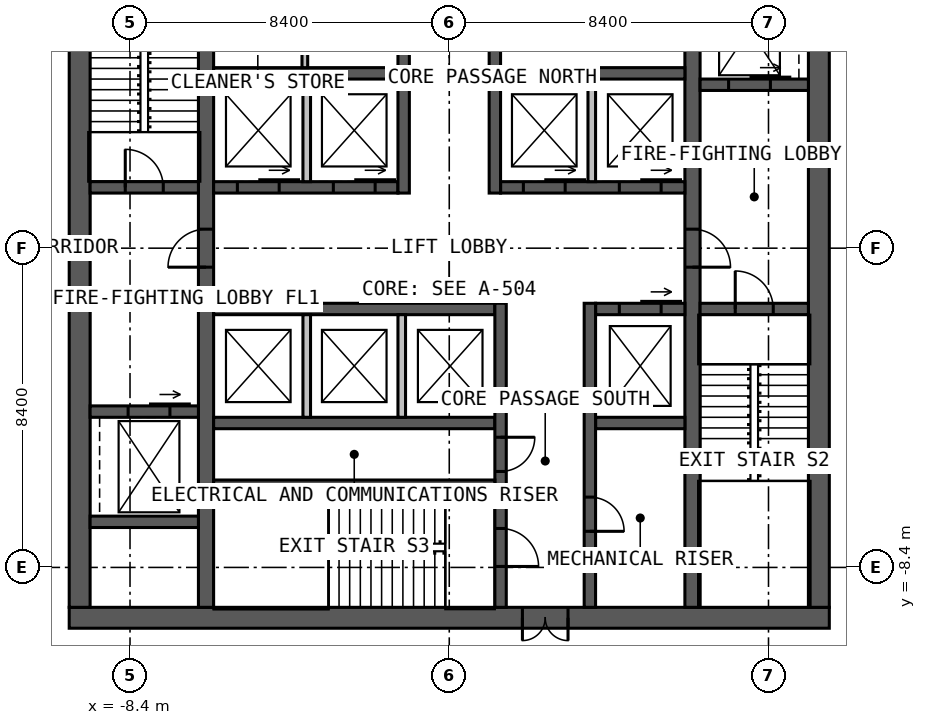
"""IFC4 building model, lengths in metres.
Left out: names, types, materials, properties, quantities, classifications, styles, units other than length and angle.
Written with IfcOpenShell. Run it as: python <this file> out.ifc"""

import sys

from ifc_helpers import new_model, si_unit, direction, frame, frame_2d, origin, place, context, subcontext, project, spatial, rectangle, extrude, element, fill, save


model = new_model("IFC4")
c1 = context("Model", 3, precision=1e-05, world=origin(), true_north=direction((0.0, 1.0)))
c2 = subcontext(c1, "Body", "Model", "MODEL_VIEW")
j1 = project(units=[si_unit("LENGTHUNIT", "METRE"), si_unit("PLANEANGLEUNIT", "RADIAN")], contexts=[c1])
p1 = place(None, origin())
s1 = spatial("IfcSite", under=j1, at=p1, CompositionType="ELEMENT")
p2 = place(p1, origin())
s2 = spatial("IfcBuilding", under=s1, at=p2, CompositionType="ELEMENT")
p3 = place(p2, frame((0.0, 0.0, 102.0)))
s3 = spatial("IfcBuildingStorey", under=s2, at=p3, CompositionType="ELEMENT", Elevation=102.0)
p4 = place(p3, frame((10.0, -9.725, 0.0), z_axis=(0.0, 0.0, 1.0), x_axis=(-1.0, 0.0, 0.0)))
e1 = element("IfcWall", 1, at=p4, inside=s3, PredefinedType="SOLIDWALL", context=c2, shape_type="SweptSolid", body=[
    extrude(rectangle(XDim=20.0, YDim=0.55, at=frame_2d((10.0, 0.0))), origin(), (0.0, 0.0, 1.0), 4.0),
])
p5 = place(p4, frame((6.875, 0.0, 0.0)))
e2 = element("IfcOpeningElement", 2, at=p5, cuts=e1, PredefinedType="OPENING", context=c2, shape_type="SweptSolid", body=[
    extrude(rectangle(XDim=1.2, YDim=2.2, at=frame_2d((0.6, 1.1))), frame((0.0, 0.285, 0.0), z_axis=(0.0, -1.0, 0.0), x_axis=(1.0, 0.0, 0.0)), (0.0, 0.0, 1.0), 0.57),
])
for number, where, z_axis, x_axis in (
    (3, (9.725, -9.45, 0.0), (0.0, 0.0, 1.0), (0.0, 1.0, 0.0)),
    (4, (-9.725, 9.45, 0.0), (0.0, 0.0, 1.0), (0.0, -1.0, 0.0)),
):
    element("IfcWall", number, at=place(p3, frame(where, z_axis=z_axis, x_axis=x_axis)), inside=s3, PredefinedType="SOLIDWALL", context=c2, shape_type="SweptSolid", body=[
        extrude(rectangle(XDim=18.9, YDim=0.55, at=frame_2d((9.45, 0.0))), origin(), (0.0, 0.0, 1.0), 4.0),
    ])
p6 = place(p3, frame((-6.4, -9.45, 0.0), z_axis=(0.0, 0.0, 1.0), x_axis=(0.0, 1.0, 0.0)))
e5 = element("IfcWall", 5, at=p6, inside=s3, PredefinedType="SOLIDWALL", context=c2, shape_type="SweptSolid", body=[
    extrude(rectangle(XDim=18.9, YDim=0.4, at=frame_2d((9.45, 0.0))), origin(), (0.0, 0.0, 1.0), 4.0),
])
p7 = place(p6, frame((8.95, 0.0, 0.0)))
e6 = element("IfcOpeningElement", 6, at=p7, cuts=e5, PredefinedType="OPENING", context=c2, shape_type="SweptSolid", body=[
    extrude(rectangle(XDim=1.0, YDim=2.2, at=frame_2d((0.5, 1.1))), frame((0.0, 0.21, 0.0), z_axis=(0.0, -1.0, 0.0), x_axis=(1.0, 0.0, 0.0)), (0.0, 0.0, 1.0), 0.42),
])
p8 = place(p3, frame((6.4, 9.45, 0.0), z_axis=(0.0, 0.0, 1.0), x_axis=(0.0, -1.0, 0.0)))
e7 = element("IfcWall", 7, at=p8, inside=s3, PredefinedType="SOLIDWALL", context=c2, shape_type="SweptSolid", body=[
    extrude(rectangle(XDim=18.9, YDim=0.4, at=frame_2d((9.45, 0.0))), origin(), (0.0, 0.0, 1.0), 4.0),
])
p9 = place(p8, frame((8.95, 0.0, 0.0)))
e8 = element("IfcOpeningElement", 8, at=p9, cuts=e7, PredefinedType="OPENING", context=c2, shape_type="SweptSolid", body=[
    extrude(rectangle(XDim=1.0, YDim=2.2, at=frame_2d((0.5, 1.1))), frame((0.0, 0.21, 0.0), z_axis=(0.0, -1.0, 0.0), x_axis=(1.0, 0.0, 0.0)), (0.0, 0.0, 1.0), 0.42),
])
p10 = place(p3, frame((-6.2, 1.6, 0.0), z_axis=(0.0, 0.0, 1.0), x_axis=(1.0, 0.0, 0.0)))
e9 = element("IfcWall", 9, at=p10, inside=s3, PredefinedType="SOLIDWALL", context=c2, shape_type="SweptSolid", body=[
    extrude(rectangle(XDim=4.85, YDim=0.3, at=frame_2d((2.425, 0.0))), origin(), (0.0, 0.0, 1.0), 4.0),
])
p11 = place(p10, frame((0.625, 0.0, 0.0)))
e10 = element("IfcOpeningElement", 10, at=p11, cuts=e9, PredefinedType="OPENING", context=c2, shape_type="SweptSolid", body=[
    extrude(rectangle(XDim=1.1, YDim=2.2, at=frame_2d((0.55, 1.1))), frame((0.0, 0.16, 0.0), z_axis=(0.0, -1.0, 0.0), x_axis=(1.0, 0.0, 0.0)), (0.0, 0.0, 1.0), 0.32),
])
p12 = place(p10, frame((3.15, 0.0, 0.0)))
e11 = element("IfcOpeningElement", 11, at=p12, cuts=e9, PredefinedType="OPENING", context=c2, shape_type="SweptSolid", body=[
    extrude(rectangle(XDim=1.1, YDim=2.2, at=frame_2d((0.55, 1.1))), frame((0.0, 0.16, 0.0), z_axis=(0.0, -1.0, 0.0), x_axis=(1.0, 0.0, 0.0)), (0.0, 0.0, 1.0), 0.32),
])
p13 = place(p3, frame((1.35, 1.6, 0.0), z_axis=(0.0, 0.0, 1.0), x_axis=(1.0, 0.0, 0.0)))
e12 = element("IfcWall", 12, at=p13, inside=s3, PredefinedType="SOLIDWALL", context=c2, shape_type="SweptSolid", body=[
    extrude(rectangle(XDim=4.85, YDim=0.3, at=frame_2d((2.425, 0.0))), origin(), (0.0, 0.0, 1.0), 4.0),
])
p14 = place(p13, frame((0.6, 0.0, 0.0)))
e13 = element("IfcOpeningElement", 13, at=p14, cuts=e12, PredefinedType="OPENING", context=c2, shape_type="SweptSolid", body=[
    extrude(rectangle(XDim=1.1, YDim=2.2, at=frame_2d((0.55, 1.1))), frame((0.0, 0.16, 0.0), z_axis=(0.0, -1.0, 0.0), x_axis=(1.0, 0.0, 0.0)), (0.0, 0.0, 1.0), 0.32),
])
p15 = place(p13, frame((3.125, 0.0, 0.0)))
e14 = element("IfcOpeningElement", 14, at=p15, cuts=e12, PredefinedType="OPENING", context=c2, shape_type="SweptSolid", body=[
    extrude(rectangle(XDim=1.1, YDim=2.2, at=frame_2d((0.55, 1.1))), frame((0.0, 0.16, 0.0), z_axis=(0.0, -1.0, 0.0), x_axis=(1.0, 0.0, 0.0)), (0.0, 0.0, 1.0), 0.32),
])
for number, where, z_axis, x_axis in (
    (15, (-6.2, 4.6, 0.0), (0.0, 0.0, 1.0), (1.0, 0.0, 0.0)),
    (16, (1.35, 4.6, 0.0), (0.0, 0.0, 1.0), (1.0, 0.0, 0.0)),
):
    element("IfcWall", number, at=place(p3, frame(where, z_axis=z_axis, x_axis=x_axis)), inside=s3, PredefinedType="SOLIDWALL", context=c2, shape_type="SweptSolid", body=[
        extrude(rectangle(XDim=4.85, YDim=0.3, at=frame_2d((2.425, 0.0))), origin(), (0.0, 0.0, 1.0), 4.0),
    ])
p16 = place(p3, frame((-1.2, 1.45, 0.0), z_axis=(0.0, 0.0, 1.0), x_axis=(0.0, 1.0, 0.0)))
e17 = element("IfcWall", 17, at=p16, inside=s3, PredefinedType="SOLIDWALL", context=c2, shape_type="SweptSolid", body=[
    extrude(rectangle(XDim=8.0, YDim=0.3, at=frame_2d((4.0, 0.0))), origin(), (0.0, 0.0, 1.0), 4.0),
])
p17 = place(p16, frame((5.05, 0.0, 0.0)))
e18 = element("IfcOpeningElement", 18, at=p17, cuts=e17, PredefinedType="OPENING", context=c2, shape_type="SweptSolid", body=[
    extrude(rectangle(XDim=1.0, YDim=2.2, at=frame_2d((0.5, 1.1))), frame((0.0, 0.16, 0.0), z_axis=(0.0, -1.0, 0.0), x_axis=(1.0, 0.0, 0.0)), (0.0, 0.0, 1.0), 0.32),
])
p18 = place(p3, frame((1.2, 1.45, 0.0), z_axis=(0.0, 0.0, 1.0), x_axis=(0.0, 1.0, 0.0)))
e19 = element("IfcWall", 19, at=p18, inside=s3, PredefinedType="SOLIDWALL", context=c2, shape_type="SweptSolid", body=[
    extrude(rectangle(XDim=8.0, YDim=0.3, at=frame_2d((4.0, 0.0))), origin(), (0.0, 0.0, 1.0), 4.0),
])
p19 = place(p18, frame((3.8, 0.0, 0.0)))
e20 = element("IfcOpeningElement", 20, at=p19, cuts=e19, PredefinedType="OPENING", context=c2, shape_type="SweptSolid", body=[
    extrude(rectangle(XDim=1.0, YDim=2.2, at=frame_2d((0.5, 1.1))), frame((0.0, 0.16, 0.0), z_axis=(0.0, -1.0, 0.0), x_axis=(1.0, 0.0, 0.0)), (0.0, 0.0, 1.0), 0.32),
])
p20 = place(p18, frame((6.15, 0.0, 0.0)))
e21 = element("IfcOpeningElement", 21, at=p20, cuts=e19, PredefinedType="OPENING", context=c2, shape_type="SweptSolid", body=[
    extrude(rectangle(XDim=1.0, YDim=2.2, at=frame_2d((0.5, 1.1))), frame((0.0, 0.16, 0.0), z_axis=(0.0, -1.0, 0.0), x_axis=(1.0, 0.0, 0.0)), (0.0, 0.0, 1.0), 0.32),
])
p21 = place(p3, frame((-6.2, -1.6, 0.0), z_axis=(0.0, 0.0, 1.0), x_axis=(1.0, 0.0, 0.0)))
e22 = element("IfcWall", 22, at=p21, inside=s3, PredefinedType="SOLIDWALL", context=c2, shape_type="SweptSolid", body=[
    extrude(rectangle(XDim=7.4, YDim=0.3, at=frame_2d((3.7, 0.0))), origin(), (0.0, 0.0, 1.0), 4.0),
])
p22 = place(p3, frame((3.85, -1.6, 0.0), z_axis=(0.0, 0.0, 1.0), x_axis=(1.0, 0.0, 0.0)))
e23 = element("IfcWall", 23, at=p22, inside=s3, PredefinedType="SOLIDWALL", context=c2, shape_type="SweptSolid", body=[
    extrude(rectangle(XDim=2.35, YDim=0.3, at=frame_2d((1.175, 0.0))), origin(), (0.0, 0.0, 1.0), 4.0),
])
p23 = place(p22, frame((0.625, 0.0, 0.0)))
e24 = element("IfcOpeningElement", 24, at=p23, cuts=e23, PredefinedType="OPENING", context=c2, shape_type="SweptSolid", body=[
    extrude(rectangle(XDim=1.1, YDim=2.2, at=frame_2d((0.55, 1.1))), frame((0.0, 0.16, 0.0), z_axis=(0.0, -1.0, 0.0), x_axis=(1.0, 0.0, 0.0)), (0.0, 0.0, 1.0), 0.32),
])
p24 = place(p3, frame((-6.2, -4.6, 0.0), z_axis=(0.0, 0.0, 1.0), x_axis=(1.0, 0.0, 0.0)))
e25 = element("IfcWall", 25, at=p24, inside=s3, PredefinedType="SOLIDWALL", context=c2, shape_type="SweptSolid", body=[
    extrude(rectangle(XDim=7.4, YDim=0.3, at=frame_2d((3.7, 0.0))), origin(), (0.0, 0.0, 1.0), 4.0),
])
p25 = place(p3, frame((3.85, -4.6, 0.0), z_axis=(0.0, 0.0, 1.0), x_axis=(1.0, 0.0, 0.0)))
e26 = element("IfcWall", 26, at=p25, inside=s3, PredefinedType="SOLIDWALL", context=c2, shape_type="SweptSolid", body=[
    extrude(rectangle(XDim=2.35, YDim=0.3, at=frame_2d((1.175, 0.0))), origin(), (0.0, 0.0, 1.0), 4.0),
])
p26 = place(p3, frame((1.35, -1.45, 0.0), z_axis=(0.0, 0.0, 1.0), x_axis=(0.0, -1.0, 0.0)))
e27 = element("IfcWall", 27, at=p26, inside=s3, PredefinedType="SOLIDWALL", context=c2, shape_type="SweptSolid", body=[
    extrude(rectangle(XDim=8.0, YDim=0.3, at=frame_2d((4.0, 0.0))), origin(), (0.0, 0.0, 1.0), 4.0),
])
p27 = place(p26, frame((5.925, 0.0, 0.0)))
e28 = element("IfcOpeningElement", 28, at=p27, cuts=e27, PredefinedType="OPENING", context=c2, shape_type="SweptSolid", body=[
    extrude(rectangle(XDim=1.0, YDim=2.2, at=frame_2d((0.5, 1.1))), frame((0.0, 0.16, 0.0), z_axis=(0.0, -1.0, 0.0), x_axis=(1.0, 0.0, 0.0)), (0.0, 0.0, 1.0), 0.32),
])
p28 = place(p26, frame((3.525, 0.0, 0.0)))
e29 = element("IfcOpeningElement", 29, at=p28, cuts=e27, PredefinedType="OPENING", context=c2, shape_type="SweptSolid", body=[
    extrude(rectangle(XDim=0.9, YDim=2.2, at=frame_2d((0.45, 1.1))), frame((0.0, 0.16, 0.0), z_axis=(0.0, -1.0, 0.0), x_axis=(1.0, 0.0, 0.0)), (0.0, 0.0, 1.0), 0.32),
])
p29 = place(p3, frame((3.7, -1.45, 0.0), z_axis=(0.0, 0.0, 1.0), x_axis=(0.0, -1.0, 0.0)))
e30 = element("IfcWall", 30, at=p29, inside=s3, PredefinedType="SOLIDWALL", context=c2, shape_type="SweptSolid", body=[
    extrude(rectangle(XDim=8.0, YDim=0.3, at=frame_2d((4.0, 0.0))), origin(), (0.0, 0.0, 1.0), 4.0),
])
p30 = place(p29, frame((5.1, 0.0, 0.0)))
e31 = element("IfcOpeningElement", 31, at=p30, cuts=e30, PredefinedType="OPENING", context=c2, shape_type="SweptSolid", body=[
    extrude(rectangle(XDim=0.9, YDim=2.2, at=frame_2d((0.45, 1.1))), frame((0.0, 0.16, 0.0), z_axis=(0.0, -1.0, 0.0), x_axis=(1.0, 0.0, 0.0)), (0.0, 0.0, 1.0), 0.32),
])
p31 = place(p3, frame((-6.2, -6.2, 0.0), z_axis=(0.0, 0.0, 1.0), x_axis=(1.0, 0.0, 0.0)))
e32 = element("IfcWall", 32, at=p31, inside=s3, PredefinedType="SOLIDWALL", context=c2, shape_type="SweptSolid", body=[
    extrude(rectangle(XDim=7.4, YDim=0.2, at=frame_2d((3.7, 0.0))), origin(), (0.0, 0.0, 1.0), 4.0),
])
p32 = place(p3, frame((-9.45, 1.6, 0.0), z_axis=(0.0, 0.0, 1.0), x_axis=(1.0, 0.0, 0.0)))
e33 = element("IfcWall", 33, at=p32, inside=s3, PredefinedType="SOLIDWALL", context=c2, shape_type="SweptSolid", body=[
    extrude(rectangle(XDim=2.85, YDim=0.3, at=frame_2d((1.425, 0.0))), origin(), (0.0, 0.0, 1.0), 4.0),
])
p33 = place(p32, frame((0.925, 0.0, 0.0)))
e34 = element("IfcOpeningElement", 34, at=p33, cuts=e33, PredefinedType="OPENING", context=c2, shape_type="SweptSolid", body=[
    extrude(rectangle(XDim=1.0, YDim=2.2, at=frame_2d((0.5, 1.1))), frame((0.0, 0.16, 0.0), z_axis=(0.0, -1.0, 0.0), x_axis=(1.0, 0.0, 0.0)), (0.0, 0.0, 1.0), 0.32),
])
p34 = place(p3, frame((6.6, -1.6, 0.0), z_axis=(0.0, 0.0, 1.0), x_axis=(1.0, 0.0, 0.0)))
e35 = element("IfcWall", 35, at=p34, inside=s3, PredefinedType="SOLIDWALL", context=c2, shape_type="SweptSolid", body=[
    extrude(rectangle(XDim=2.85, YDim=0.3, at=frame_2d((1.425, 0.0))), origin(), (0.0, 0.0, 1.0), 4.0),
])
p35 = place(p34, frame((0.925, 0.0, 0.0)))
e36 = element("IfcOpeningElement", 36, at=p35, cuts=e35, PredefinedType="OPENING", context=c2, shape_type="SweptSolid", body=[
    extrude(rectangle(XDim=1.0, YDim=2.2, at=frame_2d((0.5, 1.1))), frame((0.0, 0.16, 0.0), z_axis=(0.0, -1.0, 0.0), x_axis=(1.0, 0.0, 0.0)), (0.0, 0.0, 1.0), 0.32),
])
p36 = place(p3, frame((-9.45, -4.3, 0.0), z_axis=(0.0, 0.0, 1.0), x_axis=(1.0, 0.0, 0.0)))
e37 = element("IfcWall", 37, at=p36, inside=s3, PredefinedType="SOLIDWALL", context=c2, shape_type="SweptSolid", body=[
    extrude(rectangle(XDim=2.85, YDim=0.3, at=frame_2d((1.425, 0.0))), origin(), (0.0, 0.0, 1.0), 4.0),
])
p37 = place(p36, frame((1.0, 0.0, 0.0)))
e38 = element("IfcOpeningElement", 38, at=p37, cuts=e37, PredefinedType="OPENING", context=c2, shape_type="SweptSolid", body=[
    extrude(rectangle(XDim=1.1, YDim=2.2, at=frame_2d((0.55, 1.1))), frame((0.0, 0.16, 0.0), z_axis=(0.0, -1.0, 0.0), x_axis=(1.0, 0.0, 0.0)), (0.0, 0.0, 1.0), 0.32),
])
p38 = place(p3, frame((6.6, 4.3, 0.0), z_axis=(0.0, 0.0, 1.0), x_axis=(1.0, 0.0, 0.0)))
e39 = element("IfcWall", 39, at=p38, inside=s3, PredefinedType="SOLIDWALL", context=c2, shape_type="SweptSolid", body=[
    extrude(rectangle(XDim=2.85, YDim=0.3, at=frame_2d((1.425, 0.0))), origin(), (0.0, 0.0, 1.0), 4.0),
])
p39 = place(p38, frame((0.75, 0.0, 0.0)))
e40 = element("IfcOpeningElement", 40, at=p39, cuts=e39, PredefinedType="OPENING", context=c2, shape_type="SweptSolid", body=[
    extrude(rectangle(XDim=1.1, YDim=2.2, at=frame_2d((0.55, 1.1))), frame((0.0, 0.16, 0.0), z_axis=(0.0, -1.0, 0.0), x_axis=(1.0, 0.0, 0.0)), (0.0, 0.0, 1.0), 0.32),
])
p40 = place(p3, frame((-9.45, -7.2, 0.0), z_axis=(0.0, 0.0, 1.0), x_axis=(1.0, 0.0, 0.0)))
e41 = element("IfcWall", 41, at=p40, inside=s3, PredefinedType="SOLIDWALL", context=c2, shape_type="SweptSolid", body=[
    extrude(rectangle(XDim=2.85, YDim=0.3, at=frame_2d((1.425, 0.0))), origin(), (0.0, 0.0, 1.0), 4.0),
])
for number, where, z_axis, x_axis in (
    (42, (-3.75, 1.75, 0.0), (0.0, 0.0, 1.0), (0.0, 1.0, 0.0)),
    (43, (3.75, 1.75, 0.0), (0.0, 0.0, 1.0), (0.0, 1.0, 0.0)),
    (44, (-3.75, -1.75, 0.0), (0.0, 0.0, 1.0), (0.0, -1.0, 0.0)),
    (45, (-1.25, -1.75, 0.0), (0.0, 0.0, 1.0), (0.0, -1.0, 0.0)),
):
    element("IfcWall", number, at=place(p3, frame(where, z_axis=z_axis, x_axis=x_axis)), inside=s3, PredefinedType="SOLIDWALL", context=c2, shape_type="SweptSolid", body=[
        extrude(rectangle(XDim=2.7, YDim=0.2, at=frame_2d((1.35, 0.0))), origin(), (0.0, 0.0, 1.0), 3.75),
    ])
p41 = place(p3, frame((-3.8, 4.75, 0.0), z_axis=(0.0, 0.0, 1.0), x_axis=(0.0, 1.0, 0.0)))
e46 = element("IfcWall", 46, at=p41, inside=s3, PredefinedType="PARTITIONING", context=c2, shape_type="SweptSolid", body=[
    extrude(rectangle(XDim=1.375, YDim=0.15, at=frame_2d((0.688, 0.0))), origin(), (0.0, 0.0, 1.0), 3.75),
])
p42 = place(p5, origin())
e47 = element("IfcDoor", 47, at=p42, inside=s3, OperationType="DOUBLE_DOOR_SINGLE_SWING", PredefinedType="DOOR", context=c2, shape_type="SweptSolid", body=[
    extrude(rectangle(XDim=1.2, YDim=2.2, at=frame_2d((0.6, 1.1))), frame((0.0, 0.025, 0.0), z_axis=(0.0, -1.0, 0.0), x_axis=(1.0, 0.0, 0.0)), (0.0, 0.0, 1.0), 0.05),
])
fill(e2, e47)
p43 = place(p7, origin())
e48 = element("IfcDoor", 48, at=p43, inside=s3, OperationType="SINGLE_SWING_LEFT", PredefinedType="DOOR", context=c2, shape_type="SweptSolid", body=[
    extrude(rectangle(XDim=1.0, YDim=2.2, at=frame_2d((0.5, 1.1))), frame((0.0, 0.025, 0.0), z_axis=(0.0, -1.0, 0.0), x_axis=(1.0, 0.0, 0.0)), (0.0, 0.0, 1.0), 0.05),
])
fill(e6, e48)
p44 = place(p9, origin())
e49 = element("IfcDoor", 49, at=p44, inside=s3, OperationType="SINGLE_SWING_RIGHT", PredefinedType="DOOR", context=c2, shape_type="SweptSolid", body=[
    extrude(rectangle(XDim=1.0, YDim=2.2, at=frame_2d((0.5, 1.1))), frame((0.0, 0.025, 0.0), z_axis=(0.0, -1.0, 0.0), x_axis=(1.0, 0.0, 0.0)), (0.0, 0.0, 1.0), 0.05),
])
fill(e8, e49)
p45 = place(p33, origin())
e50 = element("IfcDoor", 50, at=p45, inside=s3, OperationType="SINGLE_SWING_LEFT", PredefinedType="DOOR", context=c2, shape_type="SweptSolid", body=[
    extrude(rectangle(XDim=1.0, YDim=2.2, at=frame_2d((0.5, 1.1))), frame((0.0, 0.025, 0.0), z_axis=(0.0, -1.0, 0.0), x_axis=(1.0, 0.0, 0.0)), (0.0, 0.0, 1.0), 0.05),
])
fill(e34, e50)
p46 = place(p35, origin())
e51 = element("IfcDoor", 51, at=p46, inside=s3, OperationType="SINGLE_SWING_LEFT", PredefinedType="DOOR", context=c2, shape_type="SweptSolid", body=[
    extrude(rectangle(XDim=1.0, YDim=2.2, at=frame_2d((0.5, 1.1))), frame((0.0, 0.025, 0.0), z_axis=(0.0, -1.0, 0.0), x_axis=(1.0, 0.0, 0.0)), (0.0, 0.0, 1.0), 0.05),
])
fill(e36, e51)
p47 = place(p27, origin())
e52 = element("IfcDoor", 52, at=p47, inside=s3, OperationType="SINGLE_SWING_RIGHT", PredefinedType="DOOR", context=c2, shape_type="SweptSolid", body=[
    extrude(rectangle(XDim=1.0, YDim=2.2, at=frame_2d((0.5, 1.1))), frame((0.0, 0.025, 0.0), z_axis=(0.0, -1.0, 0.0), x_axis=(1.0, 0.0, 0.0)), (0.0, 0.0, 1.0), 0.05),
])
fill(e28, e52)
p48 = place(p28, origin())
e53 = element("IfcDoor", 53, at=p48, inside=s3, OperationType="SINGLE_SWING_LEFT", PredefinedType="DOOR", context=c2, shape_type="SweptSolid", body=[
    extrude(rectangle(XDim=0.9, YDim=2.2, at=frame_2d((0.45, 1.1))), frame((0.0, 0.025, 0.0), z_axis=(0.0, -1.0, 0.0), x_axis=(1.0, 0.0, 0.0)), (0.0, 0.0, 1.0), 0.05),
])
fill(e29, e53)
p49 = place(p30, origin())
e54 = element("IfcDoor", 54, at=p49, inside=s3, OperationType="SINGLE_SWING_RIGHT", PredefinedType="DOOR", context=c2, shape_type="SweptSolid", body=[
    extrude(rectangle(XDim=0.9, YDim=2.2, at=frame_2d((0.45, 1.1))), frame((0.0, 0.025, 0.0), z_axis=(0.0, -1.0, 0.0), x_axis=(1.0, 0.0, 0.0)), (0.0, 0.0, 1.0), 0.05),
])
fill(e31, e54)
p50 = place(p11, origin())
e55 = element("IfcDoor", 55, at=p50, inside=s3, OperationType="SLIDING_TO_LEFT", PredefinedType="DOOR", context=c2, shape_type="SweptSolid", body=[
    extrude(rectangle(XDim=1.1, YDim=2.2, at=frame_2d((0.55, 1.1))), frame((0.0, 0.025, 0.0), z_axis=(0.0, -1.0, 0.0), x_axis=(1.0, 0.0, 0.0)), (0.0, 0.0, 1.0), 0.05),
])
fill(e10, e55)
p51 = place(p12, origin())
e56 = element("IfcDoor", 56, at=p51, inside=s3, OperationType="SLIDING_TO_LEFT", PredefinedType="DOOR", context=c2, shape_type="SweptSolid", body=[
    extrude(rectangle(XDim=1.1, YDim=2.2, at=frame_2d((0.55, 1.1))), frame((0.0, 0.025, 0.0), z_axis=(0.0, -1.0, 0.0), x_axis=(1.0, 0.0, 0.0)), (0.0, 0.0, 1.0), 0.05),
])
fill(e11, e56)
p52 = place(p14, origin())
e57 = element("IfcDoor", 57, at=p52, inside=s3, OperationType="SLIDING_TO_LEFT", PredefinedType="DOOR", context=c2, shape_type="SweptSolid", body=[
    extrude(rectangle(XDim=1.1, YDim=2.2, at=frame_2d((0.55, 1.1))), frame((0.0, 0.025, 0.0), z_axis=(0.0, -1.0, 0.0), x_axis=(1.0, 0.0, 0.0)), (0.0, 0.0, 1.0), 0.05),
])
fill(e13, e57)
p53 = place(p15, origin())
e58 = element("IfcDoor", 58, at=p53, inside=s3, OperationType="SLIDING_TO_LEFT", PredefinedType="DOOR", context=c2, shape_type="SweptSolid", body=[
    extrude(rectangle(XDim=1.1, YDim=2.2, at=frame_2d((0.55, 1.1))), frame((0.0, 0.025, 0.0), z_axis=(0.0, -1.0, 0.0), x_axis=(1.0, 0.0, 0.0)), (0.0, 0.0, 1.0), 0.05),
])
fill(e14, e58)
p54 = place(p23, origin())
e59 = element("IfcDoor", 59, at=p54, inside=s3, OperationType="SLIDING_TO_LEFT", PredefinedType="DOOR", context=c2, shape_type="SweptSolid", body=[
    extrude(rectangle(XDim=1.1, YDim=2.2, at=frame_2d((0.55, 1.1))), frame((0.0, 0.025, 0.0), z_axis=(0.0, -1.0, 0.0), x_axis=(1.0, 0.0, 0.0)), (0.0, 0.0, 1.0), 0.05),
])
fill(e24, e59)
p55 = place(p37, origin())
e60 = element("IfcDoor", 60, at=p55, inside=s3, OperationType="SLIDING_TO_LEFT", PredefinedType="DOOR", context=c2, shape_type="SweptSolid", body=[
    extrude(rectangle(XDim=1.1, YDim=2.2, at=frame_2d((0.55, 1.1))), frame((0.0, 0.025, 0.0), z_axis=(0.0, -1.0, 0.0), x_axis=(1.0, 0.0, 0.0)), (0.0, 0.0, 1.0), 0.05),
])
fill(e38, e60)
p56 = place(p39, origin())
e61 = element("IfcDoor", 61, at=p56, inside=s3, OperationType="SLIDING_TO_LEFT", PredefinedType="DOOR", context=c2, shape_type="SweptSolid", body=[
    extrude(rectangle(XDim=1.1, YDim=2.2, at=frame_2d((0.55, 1.1))), frame((0.0, 0.025, 0.0), z_axis=(0.0, -1.0, 0.0), x_axis=(1.0, 0.0, 0.0)), (0.0, 0.0, 1.0), 0.05),
])
fill(e40, e61)
save(model, sys.argv[1])
